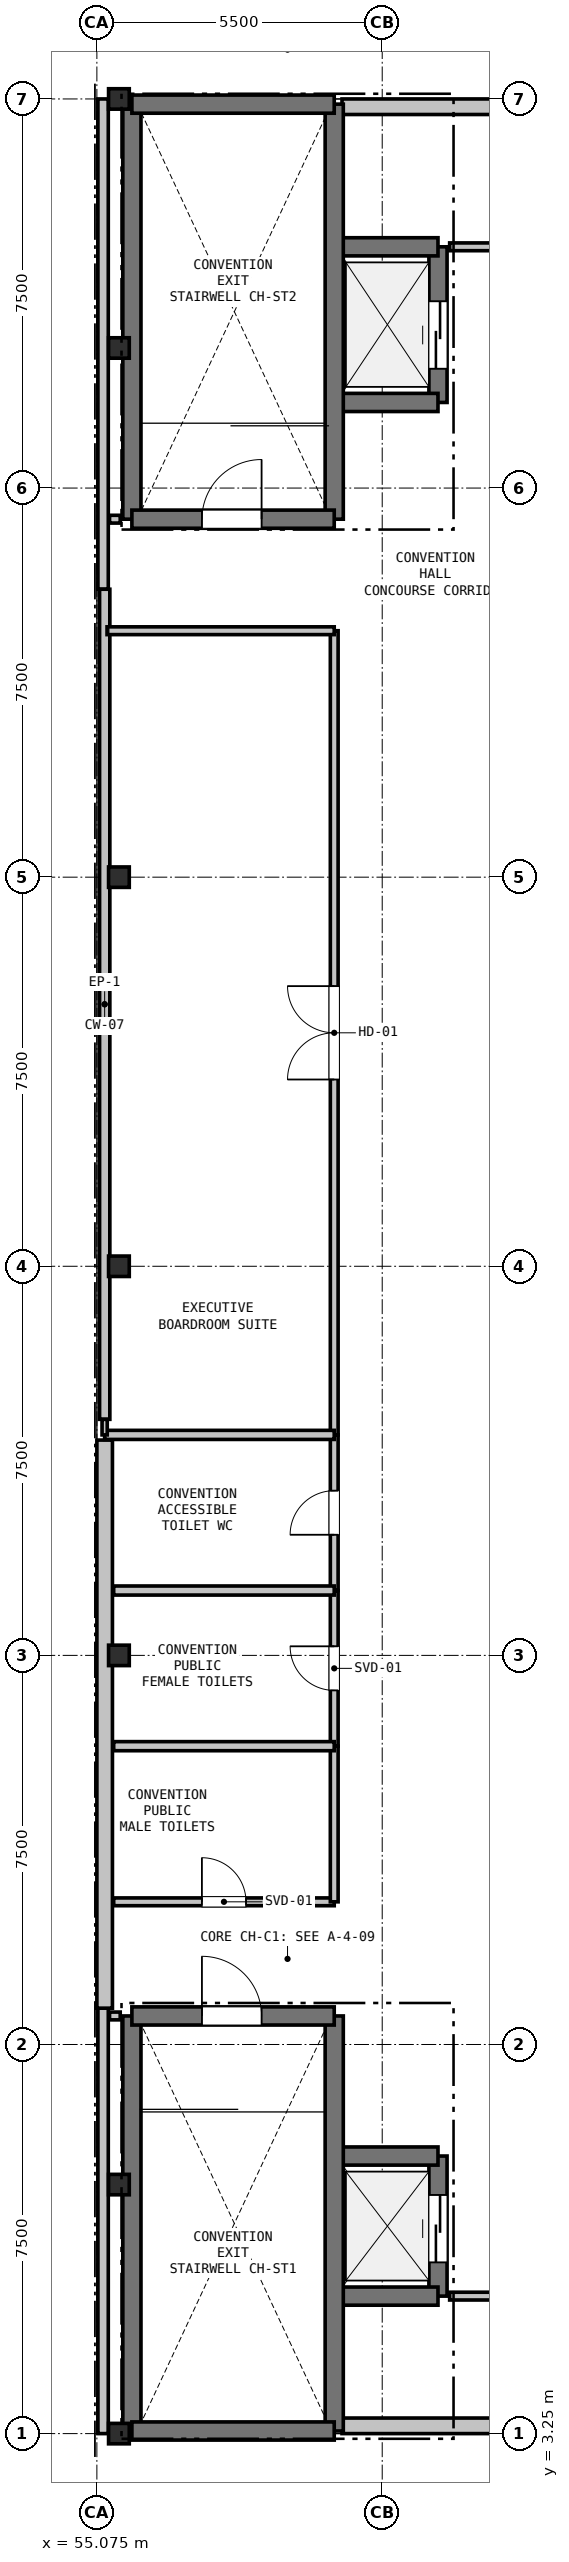
"""IFC4 building model, lengths in metres.
Left out: names, types, materials, properties, quantities, classifications, styles, units other than length and angle.
Written with IfcOpenShell. Run it as: python <this file> out.ifc"""

import sys

from ifc_helpers import new_model, si_unit, direction, frame, frame_2d, origin, origin_2d, place, context, subcontext, project, spatial, rectangle, i_section, extrude, element, fill, save


model = new_model("IFC4")
c1 = context("Model", 3, precision=1e-05, world=origin(), true_north=direction((0.0, 1.0)))
c2 = subcontext(c1, "Body", "Model", "MODEL_VIEW")
j1 = project(units=[si_unit("LENGTHUNIT", "METRE"), si_unit("PLANEANGLEUNIT", "RADIAN")], contexts=[c1])
p1 = place(None, origin())
s1 = spatial("IfcSite", under=j1, at=p1, CompositionType="ELEMENT")
p2 = place(p1, origin())
s2 = spatial("IfcBuilding", under=s1, at=p2, CompositionType="ELEMENT")
p3 = place(p2, frame((0.0, 0.0, 14.4)))
s3 = spatial("IfcBuildingStorey", under=s2, at=p3, CompositionType="ELEMENT", Elevation=14.4)
for number, where, z_axis, x_axis in (
    (1, (55.5, 3.25, 0.0), (0.0, 0.0, 1.0), (1.0, 0.0, 0.0)),
    (2, (55.5, 8.05, 0.0), (0.0, 0.0, 1.0), (1.0, 0.0, 0.0)),
    (3, (55.5, 18.25, 0.0), (0.0, 0.0, 1.0), (1.0, 0.0, 0.0)),
    (4, (55.5, 25.75, 0.0), (0.0, 0.0, 1.0), (1.0, 0.0, 0.0)),
    (5, (55.5, 33.25, 0.0), (0.0, 0.0, 1.0), (1.0, 0.0, 0.0)),
    (6, (55.5, 43.45, 0.0), (0.0, 0.0, 1.0), (1.0, 0.0, 0.0)),
    (7, (55.5, 48.25, 0.0), (0.0, 0.0, 1.0), (1.0, 0.0, 0.0)),
):
    element("IfcColumn", number, at=place(p3, frame(where, z_axis=z_axis, x_axis=x_axis)), inside=s3, PredefinedType="COLUMN", context=c2, shape_type="SweptSolid", body=[
        extrude(i_section(OverallWidth=0.399, OverallDepth=0.394, WebThickness=0.023, FlangeThickness=0.037, at=origin_2d()), origin(), (0.0, 0.0, 1.0), 4.8),
    ])
p4 = place(p3, frame((55.195, 3.25, 0.0), z_axis=(0.0, 0.0, 1.0), x_axis=(0.0, 1.0, 0.0)))
e8 = element("IfcWall", 8, at=p4, inside=s3, PredefinedType="PARAPET", context=c2, shape_type="SweptSolid", body=[
    extrude(rectangle(XDim=8.2, YDim=0.2, at=frame_2d((4.1, 0.0))), origin(), (0.0, 0.0, 1.0), 4.41),
])
p5 = place(p3, frame((55.195, 38.8, 0.0), z_axis=(0.0, 0.0, 1.0), x_axis=(0.0, 1.0, 0.0)))
e9 = element("IfcWall", 9, at=p5, inside=s3, PredefinedType="PARAPET", context=c2, shape_type="SweptSolid", body=[
    extrude(rectangle(XDim=9.45, YDim=0.2, at=frame_2d((4.725, 0.0))), origin(), (0.0, 0.0, 1.0), 4.41),
])
p6 = place(p3, frame((55.225, 11.45, 0.0), z_axis=(0.0, 0.0, 1.0), x_axis=(0.0, 1.0, 0.0)))
e10 = element("IfcWall", 10, at=p6, inside=s3, PredefinedType="SOLIDWALL", context=c2, shape_type="SweptSolid", body=[
    extrude(rectangle(XDim=10.95, YDim=0.3, at=frame_2d((5.475, 0.0))), origin(), (0.0, 0.0, 1.0), 4.41),
])
for number, where, z_axis, x_axis in (
    (11, (59.8, 48.1, 0.0), (0.0, 0.0, 1.0), (1.0, 0.0, 0.0)),
    (12, (76.925, 3.4, 0.0), (0.0, 0.0, 1.0), (-1.0, 0.0, 0.0)),
):
    element("IfcWall", number, at=place(p3, frame(where, z_axis=z_axis, x_axis=x_axis)), inside=s3, PredefinedType="SOLIDWALL", context=c2, shape_type="SweptSolid", body=[
        extrude(rectangle(XDim=17.125, YDim=0.3, at=frame_2d((8.562, 0.0))), origin(), (0.0, 0.0, 1.0), 3.858),
    ])
p7 = place(p3, frame((55.225, 22.8, 0.0), z_axis=(0.0, 0.0, 1.0), x_axis=(0.0, 1.0, 0.0)))
e13 = element("IfcWall", 13, at=p7, inside=s3, PredefinedType="PARAPET", context=c2, shape_type="SweptSolid", body=[
    extrude(rectangle(XDim=16.0, YDim=0.2, at=frame_2d((8.0, 0.0))), origin(), (0.0, 0.0, 1.0), 0.2),
])
p8 = place(p3, frame((61.65, 5.9, 0.0), z_axis=(0.0, 0.0, 1.0), x_axis=(0.0, 1.0, 0.0)))
e14 = element("IfcWall", 14, at=p8, inside=s3, PredefinedType="SHEAR", context=c2, shape_type="SweptSolid", body=[
    extrude(rectangle(XDim=2.7, YDim=0.35, at=frame_2d((1.35, 0.0))), origin(), (0.0, 0.0, 1.0), 4.8),
])
p9 = place(p8, frame((0.65, 0.0, 0.0)))
e15 = element("IfcOpeningElement", 15, at=p9, cuts=e14, PredefinedType="OPENING", context=c2, shape_type="SweptSolid", body=[
    extrude(rectangle(XDim=1.3, YDim=2.2, at=frame_2d((0.65, 1.1))), frame((0.0, 0.185, 0.0), z_axis=(0.0, -1.0, 0.0), x_axis=(1.0, 0.0, 0.0)), (0.0, 0.0, 1.0), 0.37),
])
for number, where, z_axis, x_axis in (
    (16, (59.65, 8.6, 0.0), (0.0, 0.0, 1.0), (1.0, 0.0, 0.0)),
    (17, (59.65, 5.9, 0.0), (0.0, 0.0, 1.0), (1.0, 0.0, 0.0)),
):
    element("IfcWall", number, at=place(p3, frame(where, z_axis=z_axis, x_axis=x_axis)), inside=s3, PredefinedType="SHEAR", context=c2, shape_type="SweptSolid", body=[
        extrude(rectangle(XDim=2.0, YDim=0.35, at=frame_2d((1.0, 0.0))), origin(), (0.0, 0.0, 1.0), 4.8),
    ])
p10 = place(p3, frame((61.65, 42.4, 0.0), z_axis=(0.0, 0.0, 1.0), x_axis=(0.0, 1.0, 0.0)))
e18 = element("IfcWall", 18, at=p10, inside=s3, PredefinedType="SHEAR", context=c2, shape_type="SweptSolid", body=[
    extrude(rectangle(XDim=3.0, YDim=0.35, at=frame_2d((1.5, 0.0))), origin(), (0.0, 0.0, 1.0), 4.8),
])
p11 = place(p10, frame((0.65, 0.0, 0.0)))
e19 = element("IfcOpeningElement", 19, at=p11, cuts=e18, PredefinedType="OPENING", context=c2, shape_type="SweptSolid", body=[
    extrude(rectangle(XDim=1.3, YDim=2.2, at=frame_2d((0.65, 1.1))), frame((0.0, 0.185, 0.0), z_axis=(0.0, -1.0, 0.0), x_axis=(1.0, 0.0, 0.0)), (0.0, 0.0, 1.0), 0.37),
])
for number, where, z_axis, x_axis in (
    (20, (59.65, 45.4, 0.0), (0.0, 0.0, 1.0), (1.0, 0.0, 0.0)),
    (21, (59.65, 42.4, 0.0), (0.0, 0.0, 1.0), (1.0, 0.0, 0.0)),
):
    element("IfcWall", number, at=place(p3, frame(where, z_axis=z_axis, x_axis=x_axis)), inside=s3, PredefinedType="SHEAR", context=c2, shape_type="SweptSolid", body=[
        extrude(rectangle(XDim=2.0, YDim=0.35, at=frame_2d((1.0, 0.0))), origin(), (0.0, 0.0, 1.0), 4.8),
    ])
for number, where, z_axis, x_axis in (
    (22, (59.65, 11.3, 0.0), (0.0, 0.0, 1.0), (0.0, -1.0, 0.0)),
    (23, (55.75, 3.3, 0.0), (0.0, 0.0, 1.0), (0.0, 1.0, 0.0)),
):
    element("IfcWall", number, at=place(p3, frame(where, z_axis=z_axis, x_axis=x_axis)), inside=s3, PredefinedType="SHEAR", context=c2, shape_type="SweptSolid", body=[
        extrude(rectangle(XDim=8.0, YDim=0.35, at=frame_2d((4.0, 0.0))), origin(), (0.0, 0.0, 1.0), 4.8),
    ])
p12 = place(p3, frame((55.75, 11.3, 0.0), z_axis=(0.0, 0.0, 1.0), x_axis=(1.0, 0.0, 0.0)))
e24 = element("IfcWall", 24, at=p12, inside=s3, PredefinedType="SHEAR", context=c2, shape_type="SweptSolid", body=[
    extrude(rectangle(XDim=3.9, YDim=0.35, at=frame_2d((1.95, 0.0))), origin(), (0.0, 0.0, 1.0), 4.8),
])
p13 = place(p12, frame((1.35, 0.0, 0.0)))
e25 = element("IfcOpeningElement", 25, at=p13, cuts=e24, PredefinedType="OPENING", context=c2, shape_type="SweptSolid", body=[
    extrude(rectangle(XDim=1.15, YDim=2.15, at=frame_2d((0.575, 1.075))), frame((0.0, 0.185, 0.0), z_axis=(0.0, -1.0, 0.0), x_axis=(1.0, 0.0, 0.0)), (0.0, 0.0, 1.0), 0.37),
])
p14 = place(p3, frame((55.75, 3.3, 0.0), z_axis=(0.0, 0.0, 1.0), x_axis=(1.0, 0.0, 0.0)))
e26 = element("IfcWall", 26, at=p14, inside=s3, PredefinedType="SHEAR", context=c2, shape_type="SweptSolid", body=[
    extrude(rectangle(XDim=3.9, YDim=0.35, at=frame_2d((1.95, 0.0))), origin(), (0.0, 0.0, 1.0), 4.8),
])
for number, where, z_axis, x_axis in (
    (27, (59.65, 48.15, 0.0), (0.0, 0.0, 1.0), (0.0, -1.0, 0.0)),
    (28, (55.75, 40.15, 0.0), (0.0, 0.0, 1.0), (0.0, 1.0, 0.0)),
):
    element("IfcWall", number, at=place(p3, frame(where, z_axis=z_axis, x_axis=x_axis)), inside=s3, PredefinedType="SHEAR", context=c2, shape_type="SweptSolid", body=[
        extrude(rectangle(XDim=8.0, YDim=0.35, at=frame_2d((4.0, 0.0))), origin(), (0.0, 0.0, 1.0), 4.8),
    ])
p15 = place(p3, frame((55.75, 48.15, 0.0), z_axis=(0.0, 0.0, 1.0), x_axis=(1.0, 0.0, 0.0)))
e29 = element("IfcWall", 29, at=p15, inside=s3, PredefinedType="SHEAR", context=c2, shape_type="SweptSolid", body=[
    extrude(rectangle(XDim=3.9, YDim=0.35, at=frame_2d((1.95, 0.0))), origin(), (0.0, 0.0, 1.0), 4.8),
])
p16 = place(p3, frame((55.75, 40.15, 0.0), z_axis=(0.0, 0.0, 1.0), x_axis=(1.0, 0.0, 0.0)))
e30 = element("IfcWall", 30, at=p16, inside=s3, PredefinedType="SHEAR", context=c2, shape_type="SweptSolid", body=[
    extrude(rectangle(XDim=3.9, YDim=0.35, at=frame_2d((1.95, 0.0))), origin(), (0.0, 0.0, 1.0), 4.8),
])
p17 = place(p16, frame((1.35, 0.0, 0.0)))
e31 = element("IfcOpeningElement", 31, at=p17, cuts=e30, PredefinedType="OPENING", context=c2, shape_type="SweptSolid", body=[
    extrude(rectangle(XDim=1.15, YDim=2.15, at=frame_2d((0.575, 1.075))), frame((0.0, 0.185, 0.0), z_axis=(0.0, -1.0, 0.0), x_axis=(1.0, 0.0, 0.0)), (0.0, 0.0, 1.0), 0.37),
])
p18 = place(p3, frame((55.525, 11.3, 0.0), z_axis=(0.0, 0.0, 1.0), x_axis=(-1.0, 0.0, 0.0)))
e32 = element("IfcWall", 32, at=p18, inside=s3, PredefinedType="PARTITIONING", context=c2, shape_type="SweptSolid", body=[
    extrude(rectangle(XDim=0.206, YDim=0.15, at=frame_2d((0.103, 0.0))), origin(), (0.0, 0.0, 1.0), 4.41),
])
p19 = place(p3, frame((55.399, 13.5, 0.0), z_axis=(0.0, 0.0, 1.0), x_axis=(1.0, 0.0, 0.0)))
e33 = element("IfcWall", 33, at=p19, inside=s3, PredefinedType="PARTITIONING", context=c2, shape_type="SweptSolid", body=[
    extrude(rectangle(XDim=4.251, YDim=0.15, at=frame_2d((2.125, 0.0))), origin(), (0.0, 0.0, 1.0), 4.41),
])
p20 = place(p19, frame((1.7, 0.0, 0.0)))
e34 = element("IfcOpeningElement", 34, at=p20, cuts=e33, PredefinedType="OPENING", context=c2, shape_type="SweptSolid", body=[
    extrude(rectangle(XDim=0.85, YDim=2.1, at=frame_2d((0.425, 1.05))), frame((0.0, 0.085, 0.0), z_axis=(0.0, -1.0, 0.0), x_axis=(1.0, 0.0, 0.0)), (0.0, 0.0, 1.0), 0.17),
])
p21 = place(p3, frame((59.65, 13.5, 0.0), z_axis=(0.0, 0.0, 1.0), x_axis=(0.0, 1.0, 0.0)))
e35 = element("IfcWall", 35, at=p21, inside=s3, PredefinedType="PARTITIONING", context=c2, shape_type="SweptSolid", body=[
    extrude(rectangle(XDim=3.0, YDim=0.15, at=frame_2d((1.5, 0.0))), origin(), (0.0, 0.0, 1.0), 4.8),
])
p22 = place(p3, frame((59.65, 16.5, 0.0), z_axis=(0.0, 0.0, 1.0), x_axis=(0.0, 1.0, 0.0)))
e36 = element("IfcWall", 36, at=p22, inside=s3, PredefinedType="PARTITIONING", context=c2, shape_type="SweptSolid", body=[
    extrude(rectangle(XDim=3.0, YDim=0.15, at=frame_2d((1.5, 0.0))), origin(), (0.0, 0.0, 1.0), 3.858),
])
p23 = place(p22, frame((1.075, 0.0, 0.0)))
e37 = element("IfcOpeningElement", 37, at=p23, cuts=e36, PredefinedType="OPENING", context=c2, shape_type="SweptSolid", body=[
    extrude(rectangle(XDim=0.85, YDim=2.1, at=frame_2d((0.425, 1.05))), frame((0.0, 0.085, 0.0), z_axis=(0.0, -1.0, 0.0), x_axis=(1.0, 0.0, 0.0)), (0.0, 0.0, 1.0), 0.17),
])
p24 = place(p3, frame((59.65, 19.5, 0.0), z_axis=(0.0, 0.0, 1.0), x_axis=(0.0, 1.0, 0.0)))
e38 = element("IfcWall", 38, at=p24, inside=s3, PredefinedType="PARTITIONING", context=c2, shape_type="SweptSolid", body=[
    extrude(rectangle(XDim=3.0, YDim=0.15, at=frame_2d((1.5, 0.0))), origin(), (0.0, 0.0, 1.0), 4.8),
])
p25 = place(p24, frame((1.075, 0.0, 0.0)))
e39 = element("IfcOpeningElement", 39, at=p25, cuts=e38, PredefinedType="OPENING", context=c2, shape_type="SweptSolid", body=[
    extrude(rectangle(XDim=0.85, YDim=2.1, at=frame_2d((0.425, 1.05))), frame((0.0, 0.085, 0.0), z_axis=(0.0, -1.0, 0.0), x_axis=(1.0, 0.0, 0.0)), (0.0, 0.0, 1.0), 0.17),
])
p26 = place(p3, frame((59.65, 22.5, 0.0), z_axis=(0.0, 0.0, 1.0), x_axis=(0.0, 1.0, 0.0)))
e40 = element("IfcWall", 40, at=p26, inside=s3, PredefinedType="PARTITIONING", context=c2, shape_type="SweptSolid", body=[
    extrude(rectangle(XDim=15.5, YDim=0.15, at=frame_2d((7.75, 0.0))), origin(), (0.0, 0.0, 1.0), 3.858),
])
p27 = place(p26, frame((6.85, 0.0, 0.0)))
e41 = element("IfcOpeningElement", 41, at=p27, cuts=e40, PredefinedType="OPENING", context=c2, shape_type="SweptSolid", body=[
    extrude(rectangle(XDim=1.8, YDim=2.2, at=frame_2d((0.9, 1.1))), frame((0.0, 0.085, 0.0), z_axis=(0.0, -1.0, 0.0), x_axis=(1.0, 0.0, 0.0)), (0.0, 0.0, 1.0), 0.17),
])
p28 = place(p3, frame((59.65, 38.0, 0.0), z_axis=(0.0, 0.0, 1.0), x_axis=(-1.0, 0.0, 0.0)))
e42 = element("IfcWall", 42, at=p28, inside=s3, PredefinedType="PARTITIONING", context=c2, shape_type="SweptSolid", body=[
    extrude(rectangle(XDim=4.379, YDim=0.15, at=frame_2d((2.189, 0.0))), origin(), (0.0, 0.0, 1.0), 4.41),
])
p29 = place(p3, frame((55.319, 40.15, 0.0), z_axis=(0.0, 0.0, 1.0), x_axis=(1.0, 0.0, 0.0)))
e43 = element("IfcWall", 43, at=p29, inside=s3, PredefinedType="PARTITIONING", context=c2, shape_type="SweptSolid", body=[
    extrude(rectangle(XDim=0.206, YDim=0.15, at=frame_2d((0.103, 0.0))), origin(), (0.0, 0.0, 1.0), 4.41),
])
for number, where, z_axis, x_axis in (
    (44, (61.875, 45.4, 0.0), (0.0, 0.0, 1.0), (1.0, 0.0, 0.0)),
    (45, (63.85, 5.9, 0.0), (0.0, 0.0, 1.0), (-1.0, 0.0, 0.0)),
):
    element("IfcWall", number, at=place(p3, frame(where, z_axis=z_axis, x_axis=x_axis)), inside=s3, PredefinedType="PARTITIONING", context=c2, shape_type="SweptSolid", body=[
        extrude(rectangle(XDim=1.975, YDim=0.15, at=frame_2d((0.988, 0.0))), origin(), (0.0, 0.0, 1.0), 4.479),
    ])
for number, where, z_axis, x_axis in (
    (46, (55.399, 16.5, 0.0), (0.0, 0.0, 1.0), (1.0, 0.0, 0.0)),
    (47, (55.399, 19.5, 0.0), (0.0, 0.0, 1.0), (1.0, 0.0, 0.0)),
):
    element("IfcWall", number, at=place(p3, frame(where, z_axis=z_axis, x_axis=x_axis)), inside=s3, PredefinedType="PLUMBINGWALL", context=c2, shape_type="SweptSolid", body=[
        extrude(rectangle(XDim=4.251, YDim=0.175, at=frame_2d((2.125, 0.0))), origin(), (0.0, 0.0, 1.0), 4.41),
    ])
p30 = place(p3, frame((55.225, 22.5, 0.0), z_axis=(0.0, 0.0, 1.0), x_axis=(1.0, 0.0, 0.0)))
e48 = element("IfcWall", 48, at=p30, inside=s3, PredefinedType="PLUMBINGWALL", context=c2, shape_type="SweptSolid", body=[
    extrude(rectangle(XDim=4.425, YDim=0.175, at=frame_2d((2.212, 0.0))), origin(), (0.0, 0.0, 1.0), 4.41),
])
p31 = place(p3, frame((55.225, 22.5, 0.0), z_axis=(0.0, 0.0, 1.0), x_axis=(0.0, 1.0, 0.0)))
e49 = element("IfcWall", 49, at=p31, inside=s3, PredefinedType="PARTITIONING", context=c2, shape_type="SweptSolid", body=[
    extrude(rectangle(XDim=0.3, YDim=0.1, at=frame_2d((0.15, 0.0))), origin(), (0.0, 0.0, 1.0), 4.41),
])
p32 = place(p9, origin())
e50 = element("IfcDoor", 50, at=p32, inside=s3, OperationType="SLIDING_TO_LEFT", PredefinedType="DOOR", context=c2, shape_type="SweptSolid", body=[
    extrude(rectangle(XDim=1.3, YDim=2.2, at=frame_2d((0.65, 1.1))), frame((0.0, 0.025, 0.0), z_axis=(0.0, -1.0, 0.0), x_axis=(1.0, 0.0, 0.0)), (0.0, 0.0, 1.0), 0.05),
])
fill(e15, e50)
p33 = place(p11, origin())
e51 = element("IfcDoor", 51, at=p33, inside=s3, OperationType="SLIDING_TO_LEFT", PredefinedType="DOOR", context=c2, shape_type="SweptSolid", body=[
    extrude(rectangle(XDim=1.3, YDim=2.2, at=frame_2d((0.65, 1.1))), frame((0.0, 0.025, 0.0), z_axis=(0.0, -1.0, 0.0), x_axis=(1.0, 0.0, 0.0)), (0.0, 0.0, 1.0), 0.05),
])
fill(e19, e51)
p34 = place(p13, origin())
e52 = element("IfcDoor", 52, at=p34, inside=s3, OperationType="SINGLE_SWING_LEFT", PredefinedType="DOOR", context=c2, shape_type="SweptSolid", body=[
    extrude(rectangle(XDim=1.15, YDim=2.15, at=frame_2d((0.575, 1.075))), frame((0.0, 0.025, 0.0), z_axis=(0.0, -1.0, 0.0), x_axis=(1.0, 0.0, 0.0)), (0.0, 0.0, 1.0), 0.05),
])
fill(e25, e52)
p35 = place(p17, origin())
e53 = element("IfcDoor", 53, at=p35, inside=s3, OperationType="SINGLE_SWING_RIGHT", PredefinedType="DOOR", context=c2, shape_type="SweptSolid", body=[
    extrude(rectangle(XDim=1.15, YDim=2.15, at=frame_2d((0.575, 1.075))), frame((0.0, 0.025, 0.0), z_axis=(0.0, -1.0, 0.0), x_axis=(1.0, 0.0, 0.0)), (0.0, 0.0, 1.0), 0.05),
])
fill(e31, e53)
p36 = place(p20, origin())
e54 = element("IfcDoor", 54, at=p36, inside=s3, OperationType="SINGLE_SWING_LEFT", PredefinedType="DOOR", context=c2, shape_type="SweptSolid", body=[
    extrude(rectangle(XDim=0.85, YDim=2.1, at=frame_2d((0.425, 1.05))), frame((0.0, 0.025, 0.0), z_axis=(0.0, -1.0, 0.0), x_axis=(1.0, 0.0, 0.0)), (0.0, 0.0, 1.0), 0.05),
])
fill(e34, e54)
p37 = place(p23, origin())
e55 = element("IfcDoor", 55, at=p37, inside=s3, OperationType="SINGLE_SWING_RIGHT", PredefinedType="DOOR", context=c2, shape_type="SweptSolid", body=[
    extrude(rectangle(XDim=0.85, YDim=2.1, at=frame_2d((0.425, 1.05))), frame((0.0, 0.025, 0.0), z_axis=(0.0, -1.0, 0.0), x_axis=(1.0, 0.0, 0.0)), (0.0, 0.0, 1.0), 0.05),
])
fill(e37, e55)
p38 = place(p25, origin())
e56 = element("IfcDoor", 56, at=p38, inside=s3, OperationType="SINGLE_SWING_LEFT", PredefinedType="DOOR", context=c2, shape_type="SweptSolid", body=[
    extrude(rectangle(XDim=0.85, YDim=2.1, at=frame_2d((0.425, 1.05))), frame((0.0, 0.025, 0.0), z_axis=(0.0, -1.0, 0.0), x_axis=(1.0, 0.0, 0.0)), (0.0, 0.0, 1.0), 0.05),
])
fill(e39, e56)
p39 = place(p27, origin())
e57 = element("IfcDoor", 57, at=p39, inside=s3, OperationType="DOUBLE_DOOR_SINGLE_SWING", PredefinedType="DOOR", context=c2, shape_type="SweptSolid", body=[
    extrude(rectangle(XDim=1.8, YDim=2.2, at=frame_2d((0.9, 1.1))), frame((0.0, 0.025, 0.0), z_axis=(0.0, -1.0, 0.0), x_axis=(1.0, 0.0, 0.0)), (0.0, 0.0, 1.0), 0.05),
])
fill(e41, e57)
save(model, sys.argv[1])
